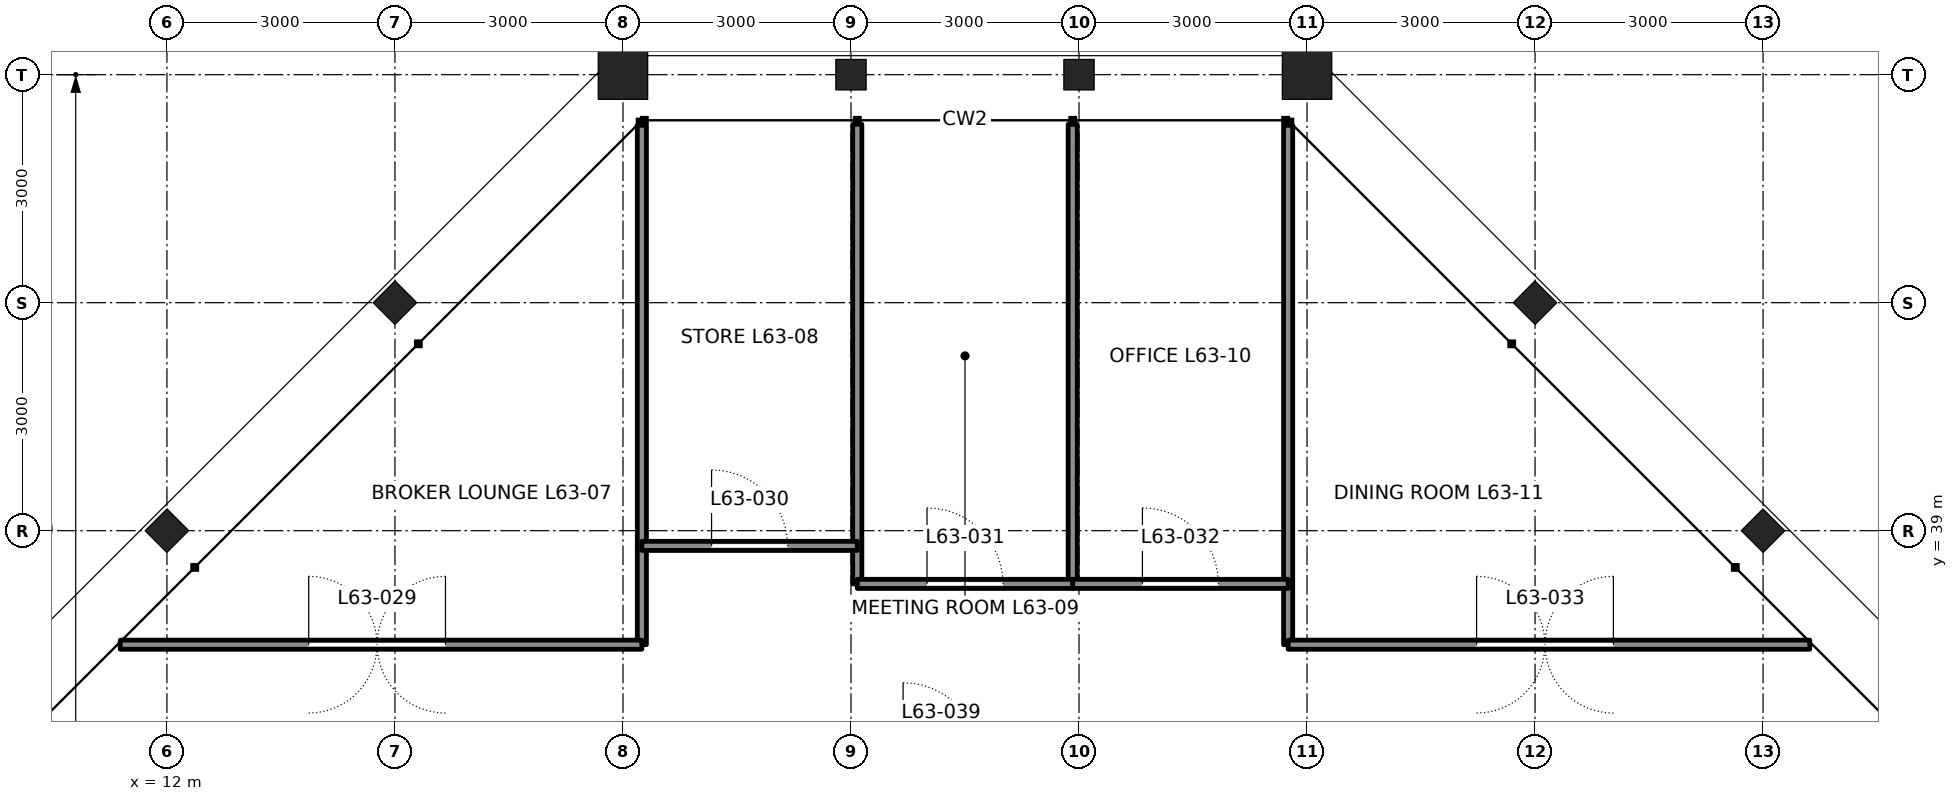
"""IFC4 building model, lengths in metres.
Left out: names, types, materials, properties, quantities, classifications, styles, units other than length and angle.
Written with IfcOpenShell. Run it as: python <this file> out.ifc"""

import sys

from ifc_helpers import new_model, si_unit, direction, frame, frame_2d, origin, origin_2d, place, context, subcontext, project, spatial, rectangle, hollow_rectangle, i_section, extrude, element, fill, save


model = new_model("IFC4")
c1 = context("Model", 3, precision=1e-05, world=origin(), true_north=direction((0.0, 1.0)))
c2 = subcontext(c1, "Body", "Model", "MODEL_VIEW")
j1 = project(units=[si_unit("LENGTHUNIT", "METRE"), si_unit("PLANEANGLEUNIT", "RADIAN")], contexts=[c1])
p1 = place(None, origin())
s1 = spatial("IfcSite", under=j1, at=p1, CompositionType="ELEMENT")
p2 = place(p1, origin())
s2 = spatial("IfcBuilding", under=s1, at=p2, CompositionType="ELEMENT")
p3 = place(p2, frame((0.0, 0.0, 283.2)))
s3 = spatial("IfcBuildingStorey", under=s2, at=p3, CompositionType="ELEMENT", Elevation=283.2)
for number, where, z_axis, x_axis in (
    (1, (33.0, 39.0, 0.0), (0.0, 0.0, 1.0), (0.707, 0.707, 0.0)),
    (2, (30.0, 42.0, 0.0), (0.0, 0.0, 1.0), (0.707, 0.707, 0.0)),
):
    element("IfcColumn", number, at=place(p3, frame(where, z_axis=z_axis, x_axis=x_axis)), inside=s3, PredefinedType="COLUMN", context=c2, shape_type="SweptSolid", body=[
        extrude(i_section(OverallWidth=0.404, OverallDepth=0.406, WebThickness=0.027, FlangeThickness=0.044, at=origin_2d()), origin(), (0.0, 0.0, 1.0), 4.2),
    ])
p4 = place(p3, frame((27.0, 45.0, 0.0), z_axis=(0.0, 0.0, 1.0), x_axis=(0.0, 1.0, 0.0)))
e3 = element("IfcColumn", 3, at=p4, inside=s3, PredefinedType="COLUMN", context=c2, shape_type="SweptSolid", body=[
    extrude(hollow_rectangle(XDim=0.65, YDim=0.65, WallThickness=0.065, at=origin_2d()), origin(), (0.0, 0.0, 1.0), 4.2),
])
for number, where, z_axis, x_axis in (
    (4, (24.0, 45.0, 0.0), (0.0, 0.0, 1.0), (0.0, 1.0, 0.0)),
    (5, (21.0, 45.0, 0.0), (0.0, 0.0, 1.0), (0.0, 1.0, 0.0)),
):
    element("IfcColumn", number, at=place(p3, frame(where, z_axis=z_axis, x_axis=x_axis)), inside=s3, PredefinedType="COLUMN", context=c2, shape_type="SweptSolid", body=[
        extrude(i_section(OverallWidth=0.401, OverallDepth=0.399, WebThickness=0.025, FlangeThickness=0.04, at=origin_2d()), origin(), (0.0, 0.0, 1.0), 4.2),
    ])
p5 = place(p3, frame((18.0, 45.0, 0.0), z_axis=(0.0, 0.0, 1.0), x_axis=(0.0, 1.0, 0.0)))
e6 = element("IfcColumn", 6, at=p5, inside=s3, PredefinedType="COLUMN", context=c2, shape_type="SweptSolid", body=[
    extrude(hollow_rectangle(XDim=0.65, YDim=0.65, WallThickness=0.065, at=origin_2d()), origin(), (0.0, 0.0, 1.0), 4.2),
])
for number, where, z_axis, x_axis in (
    (7, (15.0, 42.0, 0.0), (0.0, 0.0, 1.0), (-0.707, 0.707, 0.0)),
    (8, (12.0, 39.0, 0.0), (0.0, 0.0, 1.0), (-0.707, 0.707, 0.0)),
):
    element("IfcColumn", number, at=place(p3, frame(where, z_axis=z_axis, x_axis=x_axis)), inside=s3, PredefinedType="COLUMN", context=c2, shape_type="SweptSolid", body=[
        extrude(i_section(OverallWidth=0.404, OverallDepth=0.406, WebThickness=0.027, FlangeThickness=0.044, at=origin_2d()), origin(), (0.0, 0.0, 1.0), 4.2),
    ])
p6 = place(p3, frame((18.249, 44.334, 0.0), z_axis=(0.0, 0.0, 1.0), x_axis=(0.0, -1.0, 0.0)))
e9 = element("IfcWall", 9, at=p6, inside=s3, PredefinedType="PARTITIONING", context=c2, shape_type="SweptSolid", body=[
    extrude(rectangle(XDim=6.834, YDim=0.12, at=frame_2d((3.417, 0.0))), origin(), (0.0, 0.0, 1.0), 4.04),
])
for number, where, z_axis, x_axis in (
    (10, (21.083, 44.347, 0.0), (0.0, 0.0, 1.0), (0.0, -1.0, 0.0)),
    (11, (23.917, 44.347, 0.0), (0.0, 0.0, 1.0), (0.0, -1.0, 0.0)),
):
    element("IfcWall", number, at=place(p3, frame(where, z_axis=z_axis, x_axis=x_axis)), inside=s3, PredefinedType="PARTITIONING", context=c2, shape_type="SweptSolid", body=[
        extrude(rectangle(XDim=6.047, YDim=0.12, at=frame_2d((3.024, 0.0))), origin(), (0.0, 0.0, 1.0), 3.357),
    ])
p7 = place(p3, frame((26.751, 44.334, 0.0), z_axis=(0.0, 0.0, 1.0), x_axis=(0.0, -1.0, 0.0)))
e12 = element("IfcWall", 12, at=p7, inside=s3, PredefinedType="PARTITIONING", context=c2, shape_type="SweptSolid", body=[
    extrude(rectangle(XDim=6.834, YDim=0.12, at=frame_2d((3.417, 0.0))), origin(), (0.0, 0.0, 1.0), 4.04),
])
p8 = place(p3, frame((11.385, 37.5, 0.0), z_axis=(0.0, 0.0, 1.0), x_axis=(1.0, 0.0, 0.0)))
e13 = element("IfcWall", 13, at=p8, inside=s3, PredefinedType="PARTITIONING", context=c2, shape_type="SweptSolid", body=[
    extrude(rectangle(XDim=6.863, YDim=0.12, at=frame_2d((3.432, 0.0))), origin(), (0.0, 0.0, 1.0), 4.04),
])
p9 = place(p8, frame((2.479, 0.0, 0.0)))
e14 = element("IfcOpeningElement", 14, at=p9, cuts=e13, PredefinedType="OPENING", context=c2, shape_type="SweptSolid", body=[
    extrude(rectangle(XDim=1.8, YDim=2.4, at=frame_2d((0.9, 1.2))), frame((0.0, 0.07, 0.0), z_axis=(0.0, -1.0, 0.0), x_axis=(1.0, 0.0, 0.0)), (0.0, 0.0, 1.0), 0.14),
])
p10 = place(p3, frame((18.249, 38.8, 0.0), z_axis=(0.0, 0.0, 1.0), x_axis=(1.0, 0.0, 0.0)))
e15 = element("IfcWall", 15, at=p10, inside=s3, PredefinedType="PARTITIONING", context=c2, shape_type="SweptSolid", body=[
    extrude(rectangle(XDim=2.834, YDim=0.12, at=frame_2d((1.417, 0.0))), origin(), (0.0, 0.0, 1.0), 4.04),
])
p11 = place(p10, frame((0.917, 0.0, 0.0)))
e16 = element("IfcOpeningElement", 16, at=p11, cuts=e15, PredefinedType="OPENING", context=c2, shape_type="SweptSolid", body=[
    extrude(rectangle(XDim=1.0, YDim=2.4, at=frame_2d((0.5, 1.2))), frame((0.0, 0.07, 0.0), z_axis=(0.0, -1.0, 0.0), x_axis=(1.0, 0.0, 0.0)), (0.0, 0.0, 1.0), 0.14),
])
p12 = place(p3, frame((21.083, 38.3, 0.0), z_axis=(0.0, 0.0, 1.0), x_axis=(1.0, 0.0, 0.0)))
e17 = element("IfcWall", 17, at=p12, inside=s3, PredefinedType="PARTITIONING", context=c2, shape_type="SweptSolid", body=[
    extrude(rectangle(XDim=2.834, YDim=0.12, at=frame_2d((1.417, 0.0))), origin(), (0.0, 0.0, 1.0), 4.04),
])
p13 = place(p12, frame((0.917, 0.0, 0.0)))
e18 = element("IfcOpeningElement", 18, at=p13, cuts=e17, PredefinedType="OPENING", context=c2, shape_type="SweptSolid", body=[
    extrude(rectangle(XDim=1.0, YDim=2.4, at=frame_2d((0.5, 1.2))), frame((0.0, 0.07, 0.0), z_axis=(0.0, -1.0, 0.0), x_axis=(1.0, 0.0, 0.0)), (0.0, 0.0, 1.0), 0.14),
])
p14 = place(p3, frame((23.917, 38.3, 0.0), z_axis=(0.0, 0.0, 1.0), x_axis=(1.0, 0.0, 0.0)))
e19 = element("IfcWall", 19, at=p14, inside=s3, PredefinedType="PARTITIONING", context=c2, shape_type="SweptSolid", body=[
    extrude(rectangle(XDim=2.834, YDim=0.12, at=frame_2d((1.417, 0.0))), origin(), (0.0, 0.0, 1.0), 4.04),
])
p15 = place(p14, frame((0.917, 0.0, 0.0)))
e20 = element("IfcOpeningElement", 20, at=p15, cuts=e19, PredefinedType="OPENING", context=c2, shape_type="SweptSolid", body=[
    extrude(rectangle(XDim=1.0, YDim=2.4, at=frame_2d((0.5, 1.2))), frame((0.0, 0.07, 0.0), z_axis=(0.0, -1.0, 0.0), x_axis=(1.0, 0.0, 0.0)), (0.0, 0.0, 1.0), 0.14),
])
p16 = place(p3, frame((26.751, 37.5, 0.0), z_axis=(0.0, 0.0, 1.0), x_axis=(1.0, 0.0, 0.0)))
e21 = element("IfcWall", 21, at=p16, inside=s3, PredefinedType="PARTITIONING", context=c2, shape_type="SweptSolid", body=[
    extrude(rectangle(XDim=6.863, YDim=0.12, at=frame_2d((3.432, 0.0))), origin(), (0.0, 0.0, 1.0), 4.04),
])
p17 = place(p16, frame((2.479, 0.0, 0.0)))
e22 = element("IfcOpeningElement", 22, at=p17, cuts=e21, PredefinedType="OPENING", context=c2, shape_type="SweptSolid", body=[
    extrude(rectangle(XDim=1.8, YDim=2.4, at=frame_2d((0.9, 1.2))), frame((0.0, 0.07, 0.0), z_axis=(0.0, -1.0, 0.0), x_axis=(1.0, 0.0, 0.0)), (0.0, 0.0, 1.0), 0.14),
])
p18 = place(p9, origin())
e23 = element("IfcDoor", 23, at=p18, inside=s3, OperationType="DOUBLE_DOOR_DOUBLE_SWING", PredefinedType="DOOR", context=c2, shape_type="SweptSolid", body=[
    extrude(rectangle(XDim=1.8, YDim=2.4, at=frame_2d((0.9, 1.2))), frame((0.0, 0.025, 0.0), z_axis=(0.0, -1.0, 0.0), x_axis=(1.0, 0.0, 0.0)), (0.0, 0.0, 1.0), 0.05),
])
fill(e14, e23)
p19 = place(p11, origin())
e24 = element("IfcDoor", 24, at=p19, inside=s3, OperationType="SINGLE_SWING_LEFT", PredefinedType="DOOR", context=c2, shape_type="SweptSolid", body=[
    extrude(rectangle(XDim=1.0, YDim=2.4, at=frame_2d((0.5, 1.2))), frame((0.0, 0.025, 0.0), z_axis=(0.0, -1.0, 0.0), x_axis=(1.0, 0.0, 0.0)), (0.0, 0.0, 1.0), 0.05),
])
fill(e16, e24)
p20 = place(p13, origin())
e25 = element("IfcDoor", 25, at=p20, inside=s3, OperationType="SINGLE_SWING_LEFT", PredefinedType="DOOR", context=c2, shape_type="SweptSolid", body=[
    extrude(rectangle(XDim=1.0, YDim=2.4, at=frame_2d((0.5, 1.2))), frame((0.0, 0.025, 0.0), z_axis=(0.0, -1.0, 0.0), x_axis=(1.0, 0.0, 0.0)), (0.0, 0.0, 1.0), 0.05),
])
fill(e18, e25)
p21 = place(p15, origin())
e26 = element("IfcDoor", 26, at=p21, inside=s3, OperationType="SINGLE_SWING_LEFT", PredefinedType="DOOR", context=c2, shape_type="SweptSolid", body=[
    extrude(rectangle(XDim=1.0, YDim=2.4, at=frame_2d((0.5, 1.2))), frame((0.0, 0.025, 0.0), z_axis=(0.0, -1.0, 0.0), x_axis=(1.0, 0.0, 0.0)), (0.0, 0.0, 1.0), 0.05),
])
fill(e20, e26)
p22 = place(p17, origin())
e27 = element("IfcDoor", 27, at=p22, inside=s3, OperationType="DOUBLE_DOOR_DOUBLE_SWING", PredefinedType="DOOR", context=c2, shape_type="SweptSolid", body=[
    extrude(rectangle(XDim=1.8, YDim=2.4, at=frame_2d((0.9, 1.2))), frame((0.0, 0.025, 0.0), z_axis=(0.0, -1.0, 0.0), x_axis=(1.0, 0.0, 0.0)), (0.0, 0.0, 1.0), 0.05),
])
fill(e22, e27)
save(model, sys.argv[1])
